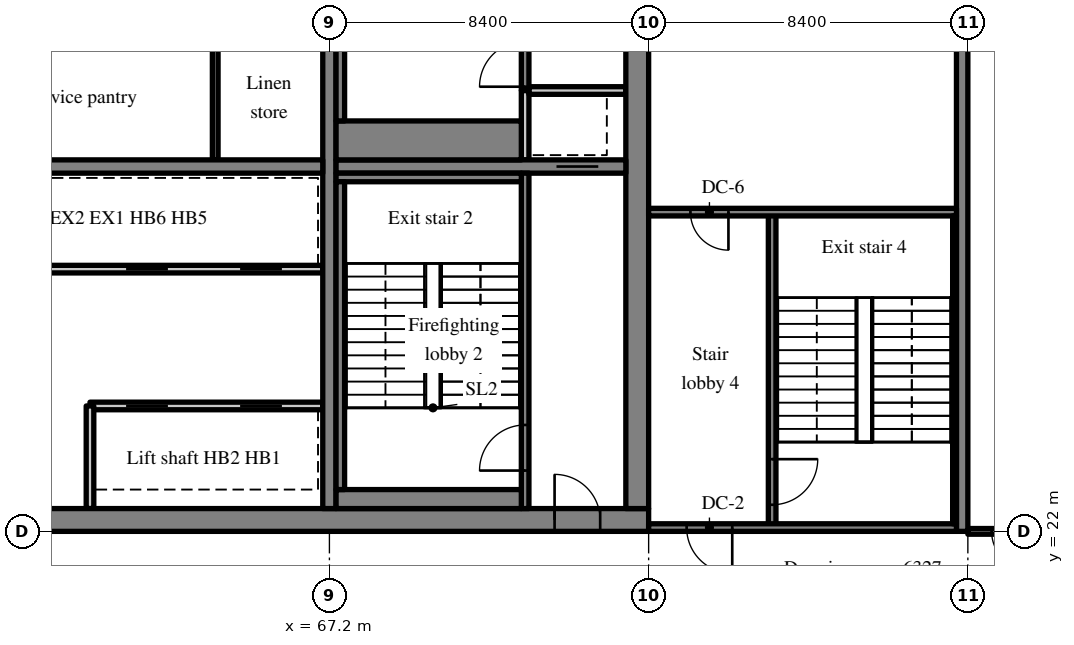
"""IFC4 building model, lengths in metres.
Left out: names, types, materials, properties, quantities, classifications, styles, units other than length and angle.
Written with IfcOpenShell. Run it as: python <this file> out.ifc"""

import sys

from ifc_helpers import new_model, si_unit, direction, frame, frame_2d, origin, place, context, subcontext, project, spatial, rectangle, extrude, source, transform, mapped, element, fill, save


model = new_model("IFC4")
c1 = context("Model", 3, precision=1e-05, world=origin(), true_north=direction((0.0, 1.0)))
c2 = subcontext(c1, "Body", "Model", "MODEL_VIEW")
j1 = project(units=[si_unit("LENGTHUNIT", "METRE"), si_unit("PLANEANGLEUNIT", "RADIAN")], contexts=[c1])
p1 = place(None, origin())
s1 = spatial("IfcSite", under=j1, at=p1, CompositionType="ELEMENT")
p2 = place(p1, origin())
s2 = spatial("IfcBuilding", under=s1, at=p2, CompositionType="ELEMENT")
p3 = place(p2, frame((0.0, 0.0, 260.8)))
s3 = spatial("IfcBuildingStorey", under=s2, at=p3, CompositionType="ELEMENT", Elevation=260.8)
m1 = source(origin(), c2, "Body", "SweptSolid", [
    extrude(rectangle(XDim=50.4, YDim=0.6, at=frame_2d((25.2, 0.0))), origin(), (0.0, 0.0, 1.0), 3.62),
])
p4 = place(p3, frame((25.2, 22.3, 0.0), z_axis=(0.0, 0.0, 1.0), x_axis=(1.0, 0.0, 0.0)))
e1 = element("IfcWall", 1, at=p4, inside=s3, PredefinedType="SHEAR", context=c2, shape_type="MappedRepresentation", body=[
    mapped(m1, transform((0.0, 0.0, 0.0), scale=1.0)),
])
m2 = source(origin(), c2, "Body", "SweptSolid", [
    extrude(rectangle(XDim=1.8, YDim=2.1, at=frame_2d((0.9, 1.05))), frame((0.0, 0.31, 0.0), z_axis=(0.0, -1.0, 0.0), x_axis=(1.0, 0.0, 0.0)), (0.0, 0.0, 1.0), 0.62),
])
p5 = place(p4, frame((15.9, 0.0, 0.0)))
e2 = element("IfcOpeningElement", 2, at=p5, cuts=e1, PredefinedType="OPENING", context=c2, shape_type="MappedRepresentation", body=[
    mapped(m2, transform((0.0, 0.0, 0.0), scale=1.0)),
])
m3 = source(origin(), c2, "Body", "SweptSolid", [
    extrude(rectangle(XDim=0.9, YDim=2.1, at=frame_2d((0.45, 1.05))), frame((0.0, 0.31, 0.0), z_axis=(0.0, -1.0, 0.0), x_axis=(1.0, 0.0, 0.0)), (0.0, 0.0, 1.0), 0.62),
])
p6 = place(p4, frame((9.687, 0.0, 0.0)))
e3 = element("IfcOpeningElement", 3, at=p6, cuts=e1, PredefinedType="OPENING", context=c2, shape_type="MappedRepresentation", body=[
    mapped(m3, transform((0.0, 0.0, 0.0), scale=1.0)),
])
p7 = place(p4, frame((21.513, 0.0, 0.0)))
e4 = element("IfcOpeningElement", 4, at=p7, cuts=e1, PredefinedType="OPENING", context=c2, shape_type="MappedRepresentation", body=[
    mapped(m3, transform((0.0, 0.0, 0.0), scale=1.0)),
])
p8 = place(p4, frame((32.7, 0.0, 0.0)))
e5 = element("IfcOpeningElement", 5, at=p8, cuts=e1, PredefinedType="OPENING", context=c2, shape_type="MappedRepresentation", body=[
    mapped(m2, transform((0.0, 0.0, 0.0), scale=1.0)),
])
m4 = source(origin(), c2, "Body", "SweptSolid", [
    extrude(rectangle(XDim=1.2, YDim=2.1, at=frame_2d((0.6, 1.05))), frame((0.0, 0.31, 0.0), z_axis=(0.0, -1.0, 0.0), x_axis=(1.0, 0.0, 0.0)), (0.0, 0.0, 1.0), 0.62),
])
p9 = place(p4, frame((6.488, 0.0, 0.0)))
e6 = element("IfcOpeningElement", 6, at=p9, cuts=e1, PredefinedType="OPENING", context=c2, shape_type="MappedRepresentation", body=[
    mapped(m4, transform((0.0, 0.0, 0.0), scale=1.0)),
])
p10 = place(p4, frame((47.925, 0.0, 0.0)))
e7 = element("IfcOpeningElement", 7, at=p10, cuts=e1, PredefinedType="OPENING", context=c2, shape_type="MappedRepresentation", body=[
    mapped(m4, transform((0.0, 0.0, 0.0), scale=1.0)),
])
m5 = source(origin(), c2, "Body", "SweptSolid", [
    extrude(rectangle(XDim=18.8, YDim=0.6, at=frame_2d((9.4, 0.0))), origin(), (0.0, 0.0, 1.0), 3.62),
])
p11 = place(p3, frame((75.3, 22.6, 0.0), z_axis=(0.0, 0.0, 1.0), x_axis=(0.0, 1.0, 0.0)))
e8 = element("IfcWall", 8, at=p11, inside=s3, PredefinedType="SHEAR", context=c2, shape_type="MappedRepresentation", body=[
    mapped(m5, transform((0.0, 0.0, 0.0), scale=1.0)),
])
p12 = place(p11, frame((12.8, 0.0, 0.0)))
e9 = element("IfcOpeningElement", 9, at=p12, cuts=e8, PredefinedType="OPENING", context=c2, shape_type="MappedRepresentation", body=[
    mapped(m4, transform((0.0, 0.0, 0.0), scale=1.0)),
])
m6 = source(origin(), c2, "Body", "SweptSolid", [
    extrude(rectangle(XDim=18.8, YDim=0.35, at=frame_2d((9.4, 0.0))), origin(), (0.0, 0.0, 1.0), 3.62),
])
p13 = place(p3, frame((67.2, 22.6, 0.0), z_axis=(0.0, 0.0, 1.0), x_axis=(0.0, 1.0, 0.0)))
e10 = element("IfcWall", 10, at=p13, inside=s3, PredefinedType="SHEAR", context=c2, shape_type="MappedRepresentation", body=[
    mapped(m6, transform((0.0, 0.0, 0.0), scale=1.0)),
])
m7 = source(origin(), c2, "Body", "SweptSolid", [
    extrude(rectangle(XDim=16.45, YDim=0.35, at=frame_2d((8.225, 0.0))), origin(), (0.0, 0.0, 1.0), 3.62),
])
p14 = place(p3, frame((50.575, 31.6, 0.0), z_axis=(0.0, 0.0, 1.0), x_axis=(1.0, 0.0, 0.0)))
e11 = element("IfcWall", 11, at=p14, inside=s3, PredefinedType="SHEAR", context=c2, shape_type="MappedRepresentation", body=[
    mapped(m7, transform((0.0, 0.0, 0.0), scale=1.0)),
])
m8 = source(origin(), c2, "Body", "SweptSolid", [
    extrude(rectangle(XDim=1.0, YDim=2.1, at=frame_2d((0.5, 1.05))), frame((0.0, 0.185, 0.0), z_axis=(0.0, -1.0, 0.0), x_axis=(1.0, 0.0, 0.0)), (0.0, 0.0, 1.0), 0.37),
])
p15 = place(p14, frame((0.613, 0.0, 0.0)))
e12 = element("IfcOpeningElement", 12, at=p15, cuts=e11, PredefinedType="OPENING", context=c2, shape_type="MappedRepresentation", body=[
    mapped(m8, transform((0.0, 0.0, 0.0), scale=1.0)),
])
m9 = source(origin(), c2, "Body", "SweptSolid", [
    extrude(rectangle(XDim=7.625, YDim=0.35, at=frame_2d((3.812, 0.0))), origin(), (0.0, 0.0, 1.0), 3.62),
])
p16 = place(p3, frame((67.375, 31.6, 0.0), z_axis=(0.0, 0.0, 1.0), x_axis=(1.0, 0.0, 0.0)))
e13 = element("IfcWall", 13, at=p16, inside=s3, PredefinedType="SHEAR", context=c2, shape_type="MappedRepresentation", body=[
    mapped(m9, transform((0.0, 0.0, 0.0), scale=1.0)),
])
m10 = source(origin(), c2, "Body", "SweptSolid", [
    extrude(rectangle(XDim=1.1, YDim=2.1, at=frame_2d((0.55, 1.05))), frame((0.0, 0.185, 0.0), z_axis=(0.0, -1.0, 0.0), x_axis=(1.0, 0.0, 0.0)), (0.0, 0.0, 1.0), 0.37),
])
p17 = place(p16, frame((5.8, 0.0, 0.0)))
e14 = element("IfcOpeningElement", 14, at=p17, cuts=e13, PredefinedType="OPENING", context=c2, shape_type="MappedRepresentation", body=[
    mapped(m10, transform((0.0, 0.0, 0.0), scale=1.0)),
])
m11 = source(origin(), c2, "Body", "SweptSolid", [
    extrude(rectangle(XDim=18.4, YDim=0.3, at=frame_2d((9.2, 0.0))), origin(), (0.0, 0.0, 1.0), 3.62),
])
p18 = place(p3, frame((83.85, 22.0, 0.0), z_axis=(0.0, 0.0, 1.0), x_axis=(0.0, 1.0, 0.0)))
e15 = element("IfcWall", 15, at=p18, inside=s3, PredefinedType="SHEAR", context=c2, shape_type="MappedRepresentation", body=[
    mapped(m11, transform((0.0, 0.0, 0.0), scale=1.0)),
])
m12 = source(origin(), c2, "Body", "SweptSolid", [
    extrude(rectangle(XDim=6.125, YDim=0.2, at=frame_2d((3.062, 0.0))), origin(), (0.0, 0.0, 1.0), 3.62),
])
p19 = place(p3, frame((67.025, 25.3, 0.0), z_axis=(0.0, 0.0, 1.0), x_axis=(-1.0, 0.0, 0.0)))
e16 = element("IfcWall", 16, at=p19, inside=s3, PredefinedType="SOLIDWALL", context=c2, shape_type="MappedRepresentation", body=[
    mapped(m12, transform((0.0, 0.0, 0.0), scale=1.0)),
])
m13 = source(origin(), c2, "Body", "SweptSolid", [
    extrude(rectangle(XDim=1.1, YDim=2.1, at=frame_2d((0.55, 1.05))), frame((0.0, 0.11, 0.0), z_axis=(0.0, -1.0, 0.0), x_axis=(1.0, 0.0, 0.0)), (0.0, 0.0, 1.0), 0.22),
])
p20 = place(p19, frame((1.075, 0.0, 0.0)))
e17 = element("IfcOpeningElement", 17, at=p20, cuts=e16, PredefinedType="OPENING", context=c2, shape_type="MappedRepresentation", body=[
    mapped(m13, transform((0.0, 0.0, 0.0), scale=1.0)),
])
p21 = place(p19, frame((4.075, 0.0, 0.0)))
e18 = element("IfcOpeningElement", 18, at=p21, cuts=e16, PredefinedType="OPENING", context=c2, shape_type="MappedRepresentation", body=[
    mapped(m13, transform((0.0, 0.0, 0.0), scale=1.0)),
])
m14 = source(origin(), c2, "Body", "SweptSolid", [
    extrude(rectangle(XDim=12.125, YDim=0.2, at=frame_2d((6.062, 0.0))), origin(), (0.0, 0.0, 1.0), 3.62),
])
p22 = place(p3, frame((67.025, 28.9, 0.0), z_axis=(0.0, 0.0, 1.0), x_axis=(-1.0, 0.0, 0.0)))
e19 = element("IfcWall", 19, at=p22, inside=s3, PredefinedType="SOLIDWALL", context=c2, shape_type="MappedRepresentation", body=[
    mapped(m14, transform((0.0, 0.0, 0.0), scale=1.0)),
])
p23 = place(p22, frame((1.075, 0.0, 0.0)))
e20 = element("IfcOpeningElement", 20, at=p23, cuts=e19, PredefinedType="OPENING", context=c2, shape_type="MappedRepresentation", body=[
    mapped(m13, transform((0.0, 0.0, 0.0), scale=1.0)),
])
p24 = place(p22, frame((4.075, 0.0, 0.0)))
e21 = element("IfcOpeningElement", 21, at=p24, cuts=e19, PredefinedType="OPENING", context=c2, shape_type="MappedRepresentation", body=[
    mapped(m13, transform((0.0, 0.0, 0.0), scale=1.0)),
])
m15 = source(origin(), c2, "Body", "SweptSolid", [
    extrude(rectangle(XDim=2.7, YDim=0.2, at=frame_2d((1.35, 0.0))), origin(), (0.0, 0.0, 1.0), 3.62),
])
p25 = place(p3, frame((60.9, 22.6, 0.0), z_axis=(0.0, 0.0, 1.0), x_axis=(0.0, 1.0, 0.0)))
e22 = element("IfcWall", 22, at=p25, inside=s3, PredefinedType="SOLIDWALL", context=c2, shape_type="MappedRepresentation", body=[
    mapped(m15, transform((0.0, 0.0, 0.0), scale=1.0)),
])
m16 = source(origin(), c2, "Body", "SweptSolid", [
    extrude(rectangle(XDim=3.225, YDim=0.15, at=frame_2d((1.613, 0.0))), origin(), (0.0, 0.0, 1.0), 3.62),
])
p26 = place(p3, frame((64.195, 31.775, 0.0), z_axis=(0.0, 0.0, 1.0), x_axis=(0.0, 1.0, 0.0)))
e23 = element("IfcWall", 23, at=p26, inside=s3, PredefinedType="PARTITIONING", context=c2, shape_type="MappedRepresentation", body=[
    mapped(m16, transform((0.0, 0.0, 0.0), scale=1.0)),
])
m17 = source(origin(), c2, "Body", "SweptSolid", [
    extrude(rectangle(XDim=8.825, YDim=0.2, at=frame_2d((4.413, 0.0))), origin(), (0.0, 0.0, 1.0), 3.62),
])
p27 = place(p3, frame((72.35, 22.6, 0.0), z_axis=(0.0, 0.0, 1.0), x_axis=(0.0, 1.0, 0.0)))
e24 = element("IfcWall", 24, at=p27, inside=s3, PredefinedType="SOLIDWALL", context=c2, shape_type="MappedRepresentation", body=[
    mapped(m17, transform((0.0, 0.0, 0.0), scale=1.0)),
])
m18 = source(origin(), c2, "Body", "SweptSolid", [
    extrude(rectangle(XDim=1.2, YDim=2.1, at=frame_2d((0.6, 1.05))), frame((0.0, 0.11, 0.0), z_axis=(0.0, -1.0, 0.0), x_axis=(1.0, 0.0, 0.0)), (0.0, 0.0, 1.0), 0.22),
])
p28 = place(p27, frame((1.0, 0.0, 0.0)))
e25 = element("IfcOpeningElement", 25, at=p28, cuts=e24, PredefinedType="OPENING", context=c2, shape_type="MappedRepresentation", body=[
    mapped(m18, transform((0.0, 0.0, 0.0), scale=1.0)),
])
m19 = source(origin(), c2, "Body", "SweptSolid", [
    extrude(rectangle(XDim=1.825, YDim=0.2, at=frame_2d((0.913, 0.0))), origin(), (0.0, 0.0, 1.0), 3.62),
])
p29 = place(p3, frame((72.35, 31.775, 0.0), z_axis=(0.0, 0.0, 1.0), x_axis=(0.0, 1.0, 0.0)))
e26 = element("IfcWall", 26, at=p29, inside=s3, PredefinedType="SOLIDWALL", context=c2, shape_type="MappedRepresentation", body=[
    mapped(m19, transform((0.0, 0.0, 0.0), scale=1.0)),
])
m20 = source(origin(), c2, "Body", "SweptSolid", [
    extrude(rectangle(XDim=2.55, YDim=0.2, at=frame_2d((1.275, 0.0))), origin(), (0.0, 0.0, 1.0), 3.62),
])
p30 = place(p3, frame((72.45, 33.6, 0.0), z_axis=(0.0, 0.0, 1.0), x_axis=(1.0, 0.0, 0.0)))
e27 = element("IfcWall", 27, at=p30, inside=s3, PredefinedType="SOLIDWALL", context=c2, shape_type="MappedRepresentation", body=[
    mapped(m20, transform((0.0, 0.0, 0.0), scale=1.0)),
])
m21 = source(origin(), c2, "Body", "SweptSolid", [
    extrude(rectangle(XDim=7.8, YDim=0.2, at=frame_2d((3.9, 0.0))), origin(), (0.0, 0.0, 1.0), 3.62),
])
p31 = place(p3, frame((72.35, 33.6, 0.0), z_axis=(0.0, 0.0, 1.0), x_axis=(0.0, 1.0, 0.0)))
e28 = element("IfcWall", 28, at=p31, inside=s3, PredefinedType="SOLIDWALL", context=c2, shape_type="MappedRepresentation", body=[
    mapped(m21, transform((0.0, 0.0, 0.0), scale=1.0)),
])
p32 = place(p31, frame((0.1, 0.0, 0.0)))
e29 = element("IfcOpeningElement", 29, at=p32, cuts=e28, PredefinedType="OPENING", context=c2, shape_type="MappedRepresentation", body=[
    mapped(m18, transform((0.0, 0.0, 0.0), scale=1.0)),
])
m22 = source(origin(), c2, "Body", "SweptSolid", [
    extrude(rectangle(XDim=8.3, YDim=0.2, at=frame_2d((4.15, 0.0))), origin(), (0.0, 0.0, 1.0), 3.62),
])
p33 = place(p3, frame((78.85, 22.1, 0.0), z_axis=(0.0, 0.0, 1.0), x_axis=(0.0, 1.0, 0.0)))
e30 = element("IfcWall", 30, at=p33, inside=s3, PredefinedType="SOLIDWALL", context=c2, shape_type="MappedRepresentation", body=[
    mapped(m22, transform((0.0, 0.0, 0.0), scale=1.0)),
])
p34 = place(p33, frame((0.6, 0.0, 0.0)))
e31 = element("IfcOpeningElement", 31, at=p34, cuts=e30, PredefinedType="OPENING", context=c2, shape_type="MappedRepresentation", body=[
    mapped(m18, transform((0.0, 0.0, 0.0), scale=1.0)),
])
m23 = source(origin(), c2, "Body", "SweptSolid", [
    extrude(rectangle(XDim=8.1, YDim=0.2, at=frame_2d((4.05, 0.0))), origin(), (0.0, 0.0, 1.0), 3.62),
])
p35 = place(p3, frame((83.7, 22.1, 0.0), z_axis=(0.0, 0.0, 1.0), x_axis=(-1.0, 0.0, 0.0)))
e32 = element("IfcWall", 32, at=p35, inside=s3, PredefinedType="SOLIDWALL", context=c2, shape_type="MappedRepresentation", body=[
    mapped(m23, transform((0.0, 0.0, 0.0), scale=1.0)),
])
p36 = place(p35, frame((5.9, 0.0, 0.0)))
e33 = element("IfcOpeningElement", 33, at=p36, cuts=e32, PredefinedType="OPENING", context=c2, shape_type="MappedRepresentation", body=[
    mapped(m18, transform((0.0, 0.0, 0.0), scale=1.0)),
])
p37 = place(p3, frame((83.7, 30.4, 0.0), z_axis=(0.0, 0.0, 1.0), x_axis=(-1.0, 0.0, 0.0)))
e34 = element("IfcWall", 34, at=p37, inside=s3, PredefinedType="SOLIDWALL", context=c2, shape_type="MappedRepresentation", body=[
    mapped(m23, transform((0.0, 0.0, 0.0), scale=1.0)),
])
m24 = source(origin(), c2, "Body", "SweptSolid", [
    extrude(rectangle(XDim=1.0, YDim=2.1, at=frame_2d((0.5, 1.05))), frame((0.0, 0.11, 0.0), z_axis=(0.0, -1.0, 0.0), x_axis=(1.0, 0.0, 0.0)), (0.0, 0.0, 1.0), 0.22),
])
p38 = place(p37, frame((6.0, 0.0, 0.0)))
e35 = element("IfcOpeningElement", 35, at=p38, cuts=e34, PredefinedType="OPENING", context=c2, shape_type="MappedRepresentation", body=[
    mapped(m24, transform((0.0, 0.0, 0.0), scale=1.0)),
])
m25 = source(origin(), c2, "Body", "SweptSolid", [
    extrude(rectangle(XDim=4.875, YDim=0.5, at=frame_2d((2.438, 0.0))), origin(), (0.0, 0.0, 1.0), 3.62),
])
p39 = place(p3, frame((67.375, 22.85, 0.0), z_axis=(0.0, 0.0, 1.0), x_axis=(1.0, 0.0, 0.0)))
e36 = element("IfcWall", 36, at=p39, inside=s3, PredefinedType="SOLIDWALL", context=c2, shape_type="MappedRepresentation", body=[
    mapped(m25, transform((0.0, 0.0, 0.0), scale=1.0)),
])
m26 = source(origin(), c2, "Body", "SweptSolid", [
    extrude(rectangle(XDim=4.875, YDim=0.225, at=frame_2d((2.438, 0.0))), origin(), (0.0, 0.0, 1.0), 3.62),
])
p40 = place(p3, frame((67.375, 31.312, 0.0), z_axis=(0.0, 0.0, 1.0), x_axis=(1.0, 0.0, 0.0)))
e37 = element("IfcWall", 37, at=p40, inside=s3, PredefinedType="SOLIDWALL", context=c2, shape_type="MappedRepresentation", body=[
    mapped(m26, transform((0.0, 0.0, 0.0), scale=1.0)),
])
m27 = source(origin(), c2, "Body", "SweptSolid", [
    extrude(rectangle(XDim=8.1, YDim=0.225, at=frame_2d((4.05, 0.0))), origin(), (0.0, 0.0, 1.0), 3.62),
])
p41 = place(p3, frame((67.487, 23.1, 0.0), z_axis=(0.0, 0.0, 1.0), x_axis=(0.0, 1.0, 0.0)))
e38 = element("IfcWall", 38, at=p41, inside=s3, PredefinedType="SOLIDWALL", context=c2, shape_type="MappedRepresentation", body=[
    mapped(m27, transform((0.0, 0.0, 0.0), scale=1.0)),
])
m28 = source(origin(), c2, "Body", "SweptSolid", [
    extrude(rectangle(XDim=4.875, YDim=1.025, at=frame_2d((2.438, 0.0))), origin(), (0.0, 0.0, 1.0), 3.62),
])
p42 = place(p3, frame((67.375, 32.287, 0.0), z_axis=(0.0, 0.0, 1.0), x_axis=(1.0, 0.0, 0.0)))
e39 = element("IfcWall", 39, at=p42, inside=s3, PredefinedType="SOLIDWALL", context=c2, shape_type="MappedRepresentation", body=[
    mapped(m28, transform((0.0, 0.0, 0.0), scale=1.0)),
])
p43 = place(p3, frame((67.487, 32.8, 0.0), z_axis=(0.0, 0.0, 1.0), x_axis=(0.0, 1.0, 0.0)))
e40 = element("IfcWall", 40, at=p43, inside=s3, PredefinedType="SOLIDWALL", context=c2, shape_type="MappedRepresentation", body=[
    mapped(m27, transform((0.0, 0.0, 0.0), scale=1.0)),
])
m29 = source(origin(), c2, "Body", "SweptSolid", [
    extrude(rectangle(XDim=8.1, YDim=0.1, at=frame_2d((4.05, 0.0))), origin(), (0.0, 0.0, 1.0), 3.62),
])
p44 = place(p3, frame((83.65, 22.2, 0.0), z_axis=(0.0, 0.0, 1.0), x_axis=(0.0, 1.0, 0.0)))
e41 = element("IfcWall", 41, at=p44, inside=s3, PredefinedType="SOLIDWALL", context=c2, shape_type="MappedRepresentation", body=[
    mapped(m29, transform((0.0, 0.0, 0.0), scale=1.0)),
])
m30 = source(origin(), c2, "Body", "SweptSolid", [
    extrude(rectangle(XDim=1.9, YDim=0.15, at=frame_2d((0.95, 0.0))), origin(), (0.0, 0.0, 1.0), 2.92),
])
p45 = place(p3, frame((84.0, 22.0, 0.0), z_axis=(0.0, 0.0, 1.0), x_axis=(1.0, 0.0, 0.0)))
e42 = element("IfcWall", 42, at=p45, inside=s3, PredefinedType="PARTITIONING", context=c2, shape_type="MappedRepresentation", body=[
    mapped(m30, transform((0.0, 0.0, 0.0), scale=1.0)),
])
m31 = source(origin(), c2, "Body", "SweptSolid", [
    extrude(rectangle(XDim=1.0, YDim=2.1, at=frame_2d((0.5, 1.05))), frame((0.0, 0.085, 0.0), z_axis=(0.0, -1.0, 0.0), x_axis=(1.0, 0.0, 0.0)), (0.0, 0.0, 1.0), 0.17),
])
p46 = place(p45, frame((0.625, 0.0, 0.0)))
e43 = element("IfcOpeningElement", 43, at=p46, cuts=e42, PredefinedType="OPENING", context=c2, shape_type="MappedRepresentation", body=[
    mapped(m31, transform((0.0, 0.0, 0.0), scale=1.0)),
])
m32 = source(origin(), c2, "Body", "SweptSolid", [
    extrude(rectangle(XDim=1.1, YDim=2.1, at=frame_2d((0.55, 1.05))), frame((0.0, 0.025, 0.0), z_axis=(0.0, -1.0, 0.0), x_axis=(1.0, 0.0, 0.0)), (0.0, 0.0, 1.0), 0.05),
])
p47 = place(p20, origin())
e44 = element("IfcDoor", 44, at=p47, inside=s3, OperationType="SLIDING_TO_RIGHT", PredefinedType="DOOR", context=c2, shape_type="MappedRepresentation", body=[
    mapped(m32, transform((0.0, 0.0, 0.0), scale=1.0)),
])
fill(e17, e44)
p48 = place(p21, origin())
e45 = element("IfcDoor", 45, at=p48, inside=s3, OperationType="SLIDING_TO_LEFT", PredefinedType="DOOR", context=c2, shape_type="MappedRepresentation", body=[
    mapped(m32, transform((0.0, 0.0, 0.0), scale=1.0)),
])
fill(e18, e45)
p49 = place(p23, origin())
e46 = element("IfcDoor", 46, at=p49, inside=s3, OperationType="SLIDING_TO_RIGHT", PredefinedType="DOOR", context=c2, shape_type="MappedRepresentation", body=[
    mapped(m32, transform((0.0, 0.0, 0.0), scale=1.0)),
])
fill(e20, e46)
p50 = place(p24, origin())
e47 = element("IfcDoor", 47, at=p50, inside=s3, OperationType="SLIDING_TO_LEFT", PredefinedType="DOOR", context=c2, shape_type="MappedRepresentation", body=[
    mapped(m32, transform((0.0, 0.0, 0.0), scale=1.0)),
])
fill(e21, e47)
m33 = source(origin(), c2, "Body", "SweptSolid", [
    extrude(rectangle(XDim=1.2, YDim=2.1, at=frame_2d((0.6, 1.05))), frame((0.0, 0.025, 0.0), z_axis=(0.0, -1.0, 0.0), x_axis=(1.0, 0.0, 0.0)), (0.0, 0.0, 1.0), 0.05),
])
p51 = place(p28, origin())
e48 = element("IfcDoor", 48, at=p51, inside=s3, OperationType="SINGLE_SWING_LEFT", PredefinedType="DOOR", context=c2, shape_type="MappedRepresentation", body=[
    mapped(m33, transform((0.0, 0.0, 0.0), scale=1.0)),
])
fill(e25, e48)
m34 = source(origin(), c2, "Body", "SweptSolid", [
    extrude(rectangle(XDim=1.2, YDim=2.1, at=frame_2d((0.6, 1.05))), frame((0.0, 0.225, 0.0), z_axis=(0.0, -1.0, 0.0), x_axis=(1.0, 0.0, 0.0)), (0.0, 0.0, 1.0), 0.05),
])
p52 = place(p10, origin())
e49 = element("IfcDoor", 49, at=p52, inside=s3, OperationType="SINGLE_SWING_LEFT", PredefinedType="DOOR", context=c2, shape_type="MappedRepresentation", body=[
    mapped(m34, transform((0.0, 0.0, 0.0), scale=1.0)),
])
fill(e7, e49)
p53 = place(p17, origin())
e50 = element("IfcDoor", 50, at=p53, inside=s3, OperationType="SLIDING_TO_LEFT", PredefinedType="DOOR", context=c2, shape_type="MappedRepresentation", body=[
    mapped(m32, transform((0.0, 0.0, 0.0), scale=1.0)),
])
fill(e14, e50)
p54 = place(p32, origin())
e51 = element("IfcDoor", 51, at=p54, inside=s3, OperationType="SINGLE_SWING_LEFT", PredefinedType="DOOR", context=c2, shape_type="MappedRepresentation", body=[
    mapped(m33, transform((0.0, 0.0, 0.0), scale=1.0)),
])
fill(e29, e51)
p55 = place(p34, origin())
e52 = element("IfcDoor", 52, at=p55, inside=s3, OperationType="SINGLE_SWING_RIGHT", PredefinedType="DOOR", context=c2, shape_type="MappedRepresentation", body=[
    mapped(m33, transform((0.0, 0.0, 0.0), scale=1.0)),
])
fill(e31, e52)
p56 = place(p36, origin())
e53 = element("IfcDoor", 53, at=p56, inside=s3, OperationType="SINGLE_SWING_LEFT", PredefinedType="DOOR", context=c2, shape_type="MappedRepresentation", body=[
    mapped(m33, transform((0.0, 0.0, 0.0), scale=1.0)),
])
fill(e33, e53)
m35 = source(origin(), c2, "Body", "SweptSolid", [
    extrude(rectangle(XDim=1.0, YDim=2.1, at=frame_2d((0.5, 1.05))), frame((0.0, 0.025, 0.0), z_axis=(0.0, -1.0, 0.0), x_axis=(1.0, 0.0, 0.0)), (0.0, 0.0, 1.0), 0.05),
])
p57 = place(p38, origin())
e54 = element("IfcDoor", 54, at=p57, inside=s3, OperationType="SINGLE_SWING_LEFT", PredefinedType="DOOR", context=c2, shape_type="MappedRepresentation", body=[
    mapped(m35, transform((0.0, 0.0, 0.0), scale=1.0)),
])
fill(e35, e54)
p58 = place(p46, origin())
e55 = element("IfcDoor", 55, at=p58, inside=s3, OperationType="SINGLE_SWING_RIGHT", PredefinedType="DOOR", context=c2, shape_type="MappedRepresentation", body=[
    mapped(m35, transform((0.0, 0.0, 0.0), scale=1.0)),
])
fill(e43, e55)
save(model, sys.argv[1])
